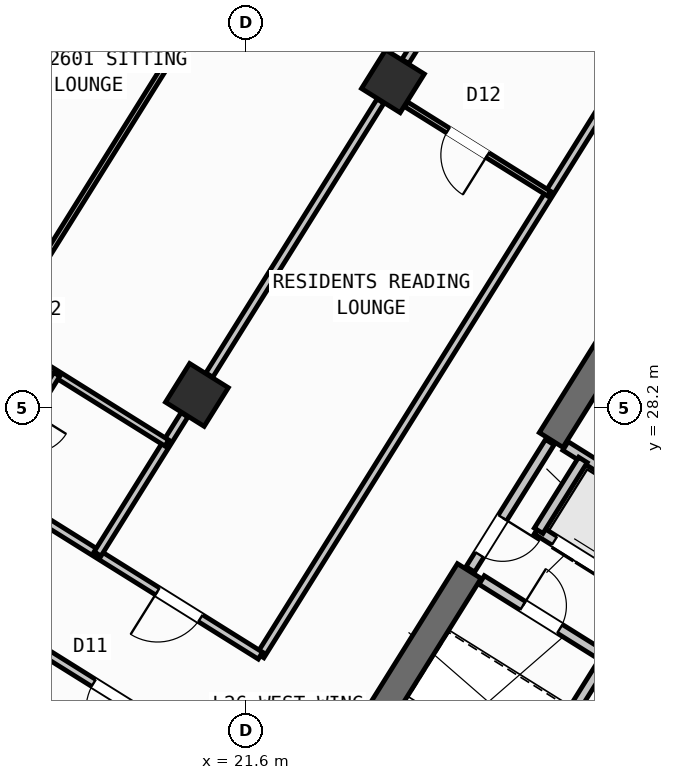
"""IFC4 building model, lengths in metres.
Left out: names, types, materials, properties, quantities, classifications, styles, units other than length and angle.
Written with IfcOpenShell. Run it as: python <this file> out.ifc"""

import sys

from ifc_helpers import new_model, si_unit, direction, frame, frame_2d, origin, origin_2d, place, context, subcontext, project, spatial, rectangle, hollow_rectangle, extrude, source, transform, mapped, element, fill, save


model = new_model("IFC4")
c1 = context("Model", 3, precision=1e-05, world=origin(), true_north=direction((0.0, 1.0)))
c2 = subcontext(c1, "Body", "Model", "MODEL_VIEW")
j1 = project(units=[si_unit("LENGTHUNIT", "METRE"), si_unit("PLANEANGLEUNIT", "RADIAN")], contexts=[c1])
p1 = place(None, origin())
s1 = spatial("IfcSite", under=j1, at=p1, CompositionType="ELEMENT")
p2 = place(p1, origin())
s2 = spatial("IfcBuilding", under=s1, at=p2, CompositionType="ELEMENT")
p3 = place(p2, frame((0.0, 0.0, 105.3)))
s3 = spatial("IfcBuildingStorey", under=s2, at=p3, CompositionType="ELEMENT", Elevation=105.3)
p4 = place(p3, frame((29.517, 30.594, 0.0), z_axis=(0.0, 0.0, 1.0), x_axis=(-0.529906864564, -0.848055844204, 0.0)))
e1 = element("IfcWall", 1, at=p4, inside=s3, PredefinedType="SHEAR", context=c2, shape_type="SweptSolid", body=[
    extrude(rectangle(XDim=3.575, YDim=0.55, at=frame_2d((1.788, 0.0))), origin(), (0.0, 0.0, 1.0), 3.35),
])
p5 = place(p3, frame((26.007, 24.976, 0.0), z_axis=(0.0, 0.0, 1.0), x_axis=(-0.529923795287, -0.848045264823, 0.0)))
e2 = element("IfcWall", 2, at=p5, inside=s3, PredefinedType="SHEAR", context=c2, shape_type="SweptSolid", body=[
    extrude(rectangle(XDim=6.425, YDim=0.55, at=frame_2d((3.212, 0.0))), origin(), (0.0, 0.0, 1.0), 3.35),
])
m1 = source(origin(), c2, "Body", "SweptSolid", [
    extrude(hollow_rectangle(XDim=0.9, YDim=0.9, WallThickness=0.036, at=origin_2d()), origin(), (0.0, 0.0, 1.0), 3.6),
])
for number, where, z_axis, x_axis in (
    (3, (24.5, 34.643, 0.0), (0.0, 0.0, 1.0), (-0.848, 0.53, 0.0)),
    (4, (20.632, 28.452, 0.0), (0.0, 0.0, 1.0), (-0.848, 0.53, 0.0)),
):
    element("IfcColumn", number, at=place(p3, frame(where, z_axis=z_axis, x_axis=x_axis)), inside=s3, PredefinedType="COLUMN", context=c2, shape_type="MappedRepresentation", body=[
        mapped(m1, transform((0.0, 0.0, 0.0), scale=1.0)),
    ])
p6 = place(p3, frame((31.76, 12.183, 0.0), z_axis=(0.0, 0.0, 1.0), x_axis=(-0.848047074256, 0.529920899612, 0.0)))
e5 = element("IfcWall", 5, at=p6, inside=s3, PredefinedType="STANDARD", context=c2, shape_type="SweptSolid", body=[
    extrude(rectangle(XDim=30.652, YDim=0.32, at=frame_2d((15.326, 0.0))), origin(), (0.0, 0.0, 1.0), 3.35),
])
p7 = place(p6, frame((15.153, 0.0, 0.0)))
e6 = element("IfcOpeningElement", 6, at=p7, cuts=e5, PredefinedType="OPENING", context=c2, shape_type="SweptSolid", body=[
    extrude(rectangle(XDim=1.2, YDim=2.15, at=frame_2d((0.6, 1.075))), frame((0.0, 0.17, 0.0), z_axis=(0.0, -1.0, 0.0), x_axis=(1.0, 0.0, 0.0)), (0.0, 0.0, 1.0), 0.34),
])
p8 = place(p6, frame((2.002, 0.0, 0.8)))
e7 = element("IfcOpeningElement", 7, at=p8, cuts=e5, PredefinedType="OPENING", context=c2, shape_type="SweptSolid", body=[
    extrude(rectangle(XDim=2.1, YDim=1.55, at=frame_2d((1.05, 0.775))), frame((0.0, 0.17, 0.0), z_axis=(0.0, -1.0, 0.0), x_axis=(1.0, 0.0, 0.0)), (0.0, 0.0, 1.0), 0.34),
])
p9 = place(p6, frame((7.206, 0.0, 0.8)))
e8 = element("IfcOpeningElement", 8, at=p9, cuts=e5, PredefinedType="OPENING", context=c2, shape_type="SweptSolid", body=[
    extrude(rectangle(XDim=2.1, YDim=1.55, at=frame_2d((1.05, 0.775))), frame((0.0, 0.17, 0.0), z_axis=(0.0, -1.0, 0.0), x_axis=(1.0, 0.0, 0.0)), (0.0, 0.0, 1.0), 0.34),
])
p10 = place(p6, frame((12.648, 0.0, 1.0)))
e9 = element("IfcOpeningElement", 9, at=p10, cuts=e5, PredefinedType="OPENING", context=c2, shape_type="SweptSolid", body=[
    extrude(rectangle(XDim=0.9, YDim=1.25, at=frame_2d((0.45, 0.625))), frame((0.0, 0.17, 0.0), z_axis=(0.0, -1.0, 0.0), x_axis=(1.0, 0.0, 0.0)), (0.0, 0.0, 1.0), 0.34),
])
p11 = place(p6, frame((20.628, 0.0, 0.95)))
e10 = element("IfcOpeningElement", 10, at=p11, cuts=e5, PredefinedType="OPENING", context=c2, shape_type="SweptSolid", body=[
    extrude(rectangle(XDim=1.2, YDim=1.4, at=frame_2d((0.6, 0.7))), frame((0.0, 0.17, 0.0), z_axis=(0.0, -1.0, 0.0), x_axis=(1.0, 0.0, 0.0)), (0.0, 0.0, 1.0), 0.34),
])
p12 = place(p6, frame((26.008, 0.0, 1.0)))
e11 = element("IfcOpeningElement", 11, at=p12, cuts=e5, PredefinedType="OPENING", context=c2, shape_type="SweptSolid", body=[
    extrude(rectangle(XDim=0.9, YDim=1.25, at=frame_2d((0.45, 0.625))), frame((0.0, 0.17, 0.0), z_axis=(0.0, -1.0, 0.0), x_axis=(1.0, 0.0, 0.0)), (0.0, 0.0, 1.0), 0.34),
])
p13 = place(p6, frame((28.408, 0.0, 1.0)))
e12 = element("IfcOpeningElement", 12, at=p13, cuts=e5, PredefinedType="OPENING", context=c2, shape_type="SweptSolid", body=[
    extrude(rectangle(XDim=0.9, YDim=1.25, at=frame_2d((0.45, 0.625))), frame((0.0, 0.17, 0.0), z_axis=(0.0, -1.0, 0.0), x_axis=(1.0, 0.0, 0.0)), (0.0, 0.0, 1.0), 0.34),
])
p14 = place(p3, frame((17.424, 47.083, 0.0), z_axis=(0.0, 0.0, 1.0), x_axis=(0.848049927979, -0.529916332693, 0.0)))
e13 = element("IfcWall", 13, at=p14, inside=s3, PredefinedType="STANDARD", context=c2, shape_type="SweptSolid", body=[
    extrude(rectangle(XDim=29.223, YDim=0.32, at=frame_2d((14.612, 0.0))), origin(), (0.0, 0.0, 1.0), 3.35),
])
p15 = place(p14, frame((3.709, 0.0, 0.0)))
e14 = element("IfcOpeningElement", 14, at=p15, cuts=e13, PredefinedType="OPENING", context=c2, shape_type="SweptSolid", body=[
    extrude(rectangle(XDim=1.05, YDim=2.15, at=frame_2d((0.525, 1.075))), frame((0.0, 0.17, 0.0), z_axis=(0.0, -1.0, 0.0), x_axis=(1.0, 0.0, 0.0)), (0.0, 0.0, 1.0), 0.34),
])
p16 = place(p14, frame((0.659, 0.0, 0.95)))
e15 = element("IfcOpeningElement", 15, at=p16, cuts=e13, PredefinedType="OPENING", context=c2, shape_type="SweptSolid", body=[
    extrude(rectangle(XDim=1.2, YDim=1.4, at=frame_2d((0.6, 0.7))), frame((0.0, 0.17, 0.0), z_axis=(0.0, -1.0, 0.0), x_axis=(1.0, 0.0, 0.0)), (0.0, 0.0, 1.0), 0.34),
])
p17 = place(p14, frame((6.972, 0.0, 1.0)))
e16 = element("IfcOpeningElement", 16, at=p17, cuts=e13, PredefinedType="OPENING", context=c2, shape_type="SweptSolid", body=[
    extrude(rectangle(XDim=0.9, YDim=1.25, at=frame_2d((0.45, 0.625))), frame((0.0, 0.17, 0.0), z_axis=(0.0, -1.0, 0.0), x_axis=(1.0, 0.0, 0.0)), (0.0, 0.0, 1.0), 0.34),
])
p18 = place(p14, frame((9.847, 0.0, 0.85)))
e17 = element("IfcOpeningElement", 17, at=p18, cuts=e13, PredefinedType="OPENING", context=c2, shape_type="SweptSolid", body=[
    extrude(rectangle(XDim=1.5, YDim=1.5, at=frame_2d((0.75, 0.75))), frame((0.0, 0.17, 0.0), z_axis=(0.0, -1.0, 0.0), x_axis=(1.0, 0.0, 0.0)), (0.0, 0.0, 1.0), 0.34),
])
p19 = place(p14, frame((13.889, 0.0, 0.95)))
e18 = element("IfcOpeningElement", 18, at=p19, cuts=e13, PredefinedType="OPENING", context=c2, shape_type="SweptSolid", body=[
    extrude(rectangle(XDim=1.2, YDim=1.4, at=frame_2d((0.6, 0.7))), frame((0.0, 0.17, 0.0), z_axis=(0.0, -1.0, 0.0), x_axis=(1.0, 0.0, 0.0)), (0.0, 0.0, 1.0), 0.34),
])
p20 = place(p14, frame((17.254, 0.0, 1.0)))
e19 = element("IfcOpeningElement", 19, at=p20, cuts=e13, PredefinedType="OPENING", context=c2, shape_type="SweptSolid", body=[
    extrude(rectangle(XDim=0.9, YDim=1.25, at=frame_2d((0.45, 0.625))), frame((0.0, 0.17, 0.0), z_axis=(0.0, -1.0, 0.0), x_axis=(1.0, 0.0, 0.0)), (0.0, 0.0, 1.0), 0.34),
])
p21 = place(p14, frame((20.764, 0.0, 0.8)))
e20 = element("IfcOpeningElement", 20, at=p21, cuts=e13, PredefinedType="OPENING", context=c2, shape_type="SweptSolid", body=[
    extrude(rectangle(XDim=2.1, YDim=1.55, at=frame_2d((1.05, 0.775))), frame((0.0, 0.17, 0.0), z_axis=(0.0, -1.0, 0.0), x_axis=(1.0, 0.0, 0.0)), (0.0, 0.0, 1.0), 0.34),
])
p22 = place(p14, frame((25.403, 0.0, 0.8)))
e21 = element("IfcOpeningElement", 21, at=p22, cuts=e13, PredefinedType="OPENING", context=c2, shape_type="SweptSolid", body=[
    extrude(rectangle(XDim=2.1, YDim=1.55, at=frame_2d((1.05, 0.775))), frame((0.0, 0.17, 0.0), z_axis=(0.0, -1.0, 0.0), x_axis=(1.0, 0.0, 0.0)), (0.0, 0.0, 1.0), 0.34),
])
p23 = place(p3, frame((31.822, 24.998, 0.0), z_axis=(0.0, 0.0, 1.0), x_axis=(-0.848036912365, 0.52993716162, 0.0)))
e22 = element("IfcWall", 22, at=p23, inside=s3, PredefinedType="STANDARD", context=c2, shape_type="SweptSolid", body=[
    extrude(rectangle(XDim=4.618, YDim=0.2, at=frame_2d((2.309, 0.0))), origin(), (0.0, 0.0, 1.0), 3.34),
])
p24 = place(p3, frame((32.108, 22.814, 0.0), z_axis=(0.0, 0.0, 1.0), x_axis=(-0.848042229521, 0.529928652696, 0.0)))
e23 = element("IfcWall", 23, at=p24, inside=s3, PredefinedType="STANDARD", context=c2, shape_type="SweptSolid", body=[
    extrude(rectangle(XDim=5.62, YDim=0.2, at=frame_2d((2.81, 0.0))), origin(), (0.0, 0.0, 1.0), 3.34),
])
p25 = place(p24, frame((0.39, 0.0, 0.0)))
e24 = element("IfcOpeningElement", 24, at=p25, cuts=e23, PredefinedType="OPENING", context=c2, shape_type="SweptSolid", body=[
    extrude(rectangle(XDim=1.1, YDim=2.15, at=frame_2d((0.55, 1.075))), frame((0.0, 0.11, 0.0), z_axis=(0.0, -1.0, 0.0), x_axis=(1.0, 0.0, 0.0)), (0.0, 0.0, 1.0), 0.22),
])
p26 = place(p24, frame((2.25, 0.0, 0.0)))
e25 = element("IfcOpeningElement", 25, at=p26, cuts=e23, PredefinedType="OPENING", context=c2, shape_type="SweptSolid", body=[
    extrude(rectangle(XDim=1.1, YDim=2.15, at=frame_2d((0.55, 1.075))), frame((0.0, 0.11, 0.0), z_axis=(0.0, -1.0, 0.0), x_axis=(1.0, 0.0, 0.0)), (0.0, 0.0, 1.0), 0.22),
])
p27 = place(p24, frame((4.11, 0.0, 0.0)))
e26 = element("IfcOpeningElement", 26, at=p27, cuts=e23, PredefinedType="OPENING", context=c2, shape_type="SweptSolid", body=[
    extrude(rectangle(XDim=1.1, YDim=2.15, at=frame_2d((0.55, 1.075))), frame((0.0, 0.11, 0.0), z_axis=(0.0, -1.0, 0.0), x_axis=(1.0, 0.0, 0.0)), (0.0, 0.0, 1.0), 0.22),
])
p28 = place(p3, frame((28.25, 27.17, 0.0), z_axis=(0.0, 0.0, 1.0), x_axis=(-0.529905827651, -0.848056492117, 0.0)))
e27 = element("IfcWall", 27, at=p28, inside=s3, PredefinedType="STANDARD", context=c2, shape_type="SweptSolid", body=[
    extrude(rectangle(XDim=1.65, YDim=0.2, at=frame_2d((0.825, 0.0))), origin(), (0.0, 0.0, 1.0), 3.34),
])
p29 = place(p3, frame((28.71, 23.263, 0.0), z_axis=(0.0, 0.0, 1.0), x_axis=(-0.529907497854, -0.848055448493, 0.0)))
e28 = element("IfcWall", 28, at=p29, inside=s3, PredefinedType="STANDARD", context=c2, shape_type="SweptSolid", body=[
    extrude(rectangle(XDim=2.88, YDim=0.2, at=frame_2d((1.44, 0.0))), origin(), (0.0, 0.0, 1.0), 3.34),
])
p30 = place(p3, frame((31.525, 21.504, 0.0), z_axis=(0.0, 0.0, 1.0), x_axis=(-0.848040211232, 0.529931882541, 0.0)))
e29 = element("IfcWall", 29, at=p30, inside=s3, PredefinedType="STANDARD", context=c2, shape_type="SweptSolid", body=[
    extrude(rectangle(XDim=6.218, YDim=0.2, at=frame_2d((3.109, 0.0))), origin(), (0.0, 0.0, 1.0), 3.34),
])
p31 = place(p30, frame((4.4, 0.0, 0.0)))
e30 = element("IfcOpeningElement", 30, at=p31, cuts=e29, PredefinedType="OPENING", context=c2, shape_type="SweptSolid", body=[
    extrude(rectangle(XDim=0.86, YDim=2.05, at=frame_2d((0.43, 1.025))), frame((0.0, 0.11, 0.0), z_axis=(0.0, -1.0, 0.0), x_axis=(1.0, 0.0, 0.0)), (0.0, 0.0, 1.0), 0.22),
])
p32 = place(p30, frame((1.45, 0.0, 0.0)))
e31 = element("IfcOpeningElement", 31, at=p32, cuts=e29, PredefinedType="OPENING", context=c2, shape_type="SweptSolid", body=[
    extrude(rectangle(XDim=0.86, YDim=2.05, at=frame_2d((0.43, 1.025))), frame((0.0, 0.11, 0.0), z_axis=(0.0, -1.0, 0.0), x_axis=(1.0, 0.0, 0.0)), (0.0, 0.0, 1.0), 0.22),
])
p33 = place(p3, frame((27.596, 27.52, 0.0), z_axis=(0.0, 0.0, 1.0), x_axis=(-0.529865479138, -0.848081702443, 0.0)))
e32 = element("IfcWall", 32, at=p33, inside=s3, PredefinedType="STANDARD", context=c2, shape_type="SweptSolid", body=[
    extrude(rectangle(XDim=2.96, YDim=0.2, at=frame_2d((1.48, 0.0))), origin(), (0.0, 0.0, 1.0), 3.34),
])
p34 = place(p33, frame((1.76, 0.0, 0.0)))
e33 = element("IfcOpeningElement", 33, at=p34, cuts=e32, PredefinedType="OPENING", context=c2, shape_type="SweptSolid", body=[
    extrude(rectangle(XDim=0.86, YDim=2.05, at=frame_2d((0.43, 1.025))), frame((0.0, 0.11, 0.0), z_axis=(0.0, -1.0, 0.0), x_axis=(1.0, 0.0, 0.0)), (0.0, 0.0, 1.0), 0.22),
])
p35 = place(p3, frame((31.239, 38.274, 0.0), z_axis=(0.0, 0.0, 1.0), x_axis=(-0.529918119251, -0.84804881162, 0.0)))
e34 = element("IfcWall", 34, at=p35, inside=s3, PredefinedType="PARTITIONING", context=c2, shape_type="SweptSolid", body=[
    extrude(rectangle(XDim=17.65, YDim=0.16, at=frame_2d((8.825, 0.0))), origin(), (0.0, 0.0, 1.0), 3.34),
])
p36 = place(p3, frame((21.885, 23.306, 0.0), z_axis=(0.0, 0.0, 1.0), x_axis=(-0.848052408131, 0.529912363569, 0.0)))
e35 = element("IfcWall", 35, at=p36, inside=s3, PredefinedType="PARTITIONING", context=c2, shape_type="SweptSolid", body=[
    extrude(rectangle(XDim=16.73, YDim=0.16, at=frame_2d((8.365, 0.0))), origin(), (0.0, 0.0, 1.0), 3.34),
])
p37 = place(p36, frame((1.395, 0.0, 0.0)))
e36 = element("IfcOpeningElement", 36, at=p37, cuts=e35, PredefinedType="OPENING", context=c2, shape_type="SweptSolid", body=[
    extrude(rectangle(XDim=1.0, YDim=2.1, at=frame_2d((0.5, 1.05))), frame((0.0, 0.09, 0.0), z_axis=(0.0, -1.0, 0.0), x_axis=(1.0, 0.0, 0.0)), (0.0, 0.0, 1.0), 0.18),
])
p38 = place(p36, frame((7.82, 0.0, 0.0)))
e37 = element("IfcOpeningElement", 37, at=p38, cuts=e35, PredefinedType="OPENING", context=c2, shape_type="SweptSolid", body=[
    extrude(rectangle(XDim=1.0, YDim=2.1, at=frame_2d((0.5, 1.05))), frame((0.0, 0.09, 0.0), z_axis=(0.0, -1.0, 0.0), x_axis=(1.0, 0.0, 0.0)), (0.0, 0.0, 1.0), 0.18),
])
p39 = place(p36, frame((14.76, 0.0, 0.0)))
e38 = element("IfcOpeningElement", 38, at=p39, cuts=e35, PredefinedType="OPENING", context=c2, shape_type="SweptSolid", body=[
    extrude(rectangle(XDim=1.0, YDim=2.1, at=frame_2d((0.5, 1.05))), frame((0.0, 0.09, 0.0), z_axis=(0.0, -1.0, 0.0), x_axis=(1.0, 0.0, 0.0)), (0.0, 0.0, 1.0), 0.18),
])
p40 = place(p3, frame((20.719, 21.44, 0.0), z_axis=(0.0, 0.0, 1.0), x_axis=(-0.848048310262, 0.529918921593, 0.0)))
e39 = element("IfcWall", 39, at=p40, inside=s3, PredefinedType="PARTITIONING", context=c2, shape_type="SweptSolid", body=[
    extrude(rectangle(XDim=16.73, YDim=0.16, at=frame_2d((8.365, 0.0))), origin(), (0.0, 0.0, 1.0), 3.34),
])
p41 = place(p40, frame((1.505, 0.0, 0.0)))
e40 = element("IfcOpeningElement", 40, at=p41, cuts=e39, PredefinedType="OPENING", context=c2, shape_type="SweptSolid", body=[
    extrude(rectangle(XDim=1.0, YDim=2.1, at=frame_2d((0.5, 1.05))), frame((0.0, 0.09, 0.0), z_axis=(0.0, -1.0, 0.0), x_axis=(1.0, 0.0, 0.0)), (0.0, 0.0, 1.0), 0.18),
])
p42 = place(p40, frame((6.435, 0.0, 0.0)))
e41 = element("IfcOpeningElement", 41, at=p42, cuts=e39, PredefinedType="OPENING", context=c2, shape_type="SweptSolid", body=[
    extrude(rectangle(XDim=1.0, YDim=2.1, at=frame_2d((0.5, 1.05))), frame((0.0, 0.09, 0.0), z_axis=(0.0, -1.0, 0.0), x_axis=(1.0, 0.0, 0.0)), (0.0, 0.0, 1.0), 0.18),
])
p43 = place(p40, frame((12.784, 0.0, 0.0)))
e42 = element("IfcOpeningElement", 42, at=p43, cuts=e39, PredefinedType="OPENING", context=c2, shape_type="SweptSolid", body=[
    extrude(rectangle(XDim=1.0, YDim=2.1, at=frame_2d((0.5, 1.05))), frame((0.0, 0.09, 0.0), z_axis=(0.0, -1.0, 0.0), x_axis=(1.0, 0.0, 0.0)), (0.0, 0.0, 1.0), 0.18),
])
p44 = place(p3, frame((27.607, 39.615, 0.0), z_axis=(0.0, 0.0, 1.0), x_axis=(-0.529913610495, -0.848051628978, 0.0)))
e43 = element("IfcWall", 43, at=p44, inside=s3, PredefinedType="PARTITIONING", context=c2, shape_type="SweptSolid", body=[
    extrude(rectangle(XDim=5.401, YDim=0.16, at=frame_2d((2.7, 0.0))), origin(), (0.0, 0.0, 1.0), 2.775),
])
p45 = place(p3, frame((24.256, 34.251, 0.0), z_axis=(0.0, 0.0, 1.0), x_axis=(-0.529919772691, -0.848047778437, 0.0)))
e44 = element("IfcWall", 44, at=p45, inside=s3, PredefinedType="PARTITIONING", context=c2, shape_type="SweptSolid", body=[
    extrude(rectangle(XDim=6.376, YDim=0.16, at=frame_2d((3.188, 0.0))), origin(), (0.0, 0.0, 1.0), 2.775),
])
p46 = place(p3, frame((20.387, 28.06, 0.0), z_axis=(0.0, 0.0, 1.0), x_axis=(-0.529890499457, -0.848066069705, 0.0)))
e45 = element("IfcWall", 45, at=p46, inside=s3, PredefinedType="PARTITIONING", context=c2, shape_type="SweptSolid", body=[
    extrude(rectangle(XDim=3.238, YDim=0.16, at=frame_2d((1.619, 0.0))), origin(), (0.0, 0.0, 1.0), 2.775),
])
p47 = place(p3, frame((27.583, 32.424, 0.0), z_axis=(0.0, 0.0, 1.0), x_axis=(-0.848031272749, 0.529946186362, 0.0)))
e46 = element("IfcWall", 46, at=p47, inside=s3, PredefinedType="PARTITIONING", context=c2, shape_type="SweptSolid", body=[
    extrude(rectangle(XDim=3.328, YDim=0.11, at=frame_2d((1.664, 0.0))), origin(), (0.0, 0.0, 1.0), 2.775),
])
p48 = place(p47, frame((1.435, 0.0, 0.0)))
e47 = element("IfcOpeningElement", 47, at=p48, cuts=e46, PredefinedType="OPENING", context=c2, shape_type="SweptSolid", body=[
    extrude(rectangle(XDim=0.92, YDim=2.08, at=frame_2d((0.46, 1.04))), frame((0.0, 0.065, 0.0), z_axis=(0.0, -1.0, 0.0), x_axis=(1.0, 0.0, 0.0)), (0.0, 0.0, 1.0), 0.13),
])
p49 = place(p3, frame((18.828, 37.643, 0.0), z_axis=(0.0, 0.0, 1.0), x_axis=(-0.529930102756, -0.848041323399, 0.0)))
e48 = element("IfcWall", 48, at=p49, inside=s3, PredefinedType="PARTITIONING", context=c2, shape_type="SweptSolid", body=[
    extrude(rectangle(XDim=6.376, YDim=0.16, at=frame_2d((3.188, 0.0))), origin(), (0.0, 0.0, 1.0), 2.775),
])
p50 = place(p3, frame((20.039, 27.502, 0.0), z_axis=(0.0, 0.0, 1.0), x_axis=(-0.848039019877, 0.529933789039, 0.0)))
e49 = element("IfcWall", 49, at=p50, inside=s3, PredefinedType="PLUMBINGWALL", context=c2, shape_type="SweptSolid", body=[
    extrude(rectangle(XDim=6.4, YDim=0.14, at=frame_2d((3.2, 0.0))), origin(), (0.0, 0.0, 1.0), 3.34),
])
p51 = place(p50, frame((2.824, 0.0, 0.0)))
e50 = element("IfcOpeningElement", 50, at=p51, cuts=e49, PredefinedType="OPENING", context=c2, shape_type="SweptSolid", body=[
    extrude(rectangle(XDim=0.78, YDim=2.05, at=frame_2d((0.39, 1.025))), frame((0.0, 0.08, 0.0), z_axis=(0.0, -1.0, 0.0), x_axis=(1.0, 0.0, 0.0)), (0.0, 0.0, 1.0), 0.16),
])
p52 = place(p3, frame((17.867, 28.859, 0.0), z_axis=(0.0, 0.0, 1.0), x_axis=(-0.529913878929, -0.848051461244, 0.0)))
e51 = element("IfcWall", 51, at=p52, inside=s3, PredefinedType="PLUMBINGWALL", context=c2, shape_type="SweptSolid", body=[
    extrude(rectangle(XDim=2.58, YDim=0.14, at=frame_2d((1.29, 0.0))), origin(), (0.0, 0.0, 1.0), 3.34),
])
p53 = place(p52, frame((0.9, 0.0, 0.0)))
e52 = element("IfcOpeningElement", 52, at=p53, cuts=e51, PredefinedType="OPENING", context=c2, shape_type="SweptSolid", body=[
    extrude(rectangle(XDim=0.78, YDim=2.05, at=frame_2d((0.39, 1.025))), frame((0.0, 0.08, 0.0), z_axis=(0.0, -1.0, 0.0), x_axis=(1.0, 0.0, 0.0)), (0.0, 0.0, 1.0), 0.16),
])
p54 = place(p3, frame((24.802, 42.614, 0.0), z_axis=(0.0, 0.0, 1.0), x_axis=(-0.529928839727, -0.848042112649, 0.0)))
e53 = element("IfcWall", 53, at=p54, inside=s3, PredefinedType="PARTITIONING", context=c2, shape_type="SweptSolid", body=[
    extrude(rectangle(XDim=15.34, YDim=0.11, at=frame_2d((7.67, 0.0))), origin(), (0.0, 0.0, 1.0), 3.34),
])
p55 = place(p54, frame((0.47, 0.0, 0.0)))
e54 = element("IfcOpeningElement", 54, at=p55, cuts=e53, PredefinedType="OPENING", context=c2, shape_type="SweptSolid", body=[
    extrude(rectangle(XDim=0.92, YDim=2.08, at=frame_2d((0.46, 1.04))), frame((0.0, 0.065, 0.0), z_axis=(0.0, -1.0, 0.0), x_axis=(1.0, 0.0, 0.0)), (0.0, 0.0, 1.0), 0.13),
])
p56 = place(p3, frame((19.67, 45.821, 0.0), z_axis=(0.0, 0.0, 1.0), x_axis=(-0.529916887708, -0.848049581169, 0.0)))
e55 = element("IfcWall", 55, at=p56, inside=s3, PredefinedType="PARTITIONING", context=c2, shape_type="SweptSolid", body=[
    extrude(rectangle(XDim=17.92, YDim=0.11, at=frame_2d((8.96, 0.0))), origin(), (0.0, 0.0, 1.0), 3.34),
])
p57 = place(p56, frame((16.28, 0.0, 0.0)))
e56 = element("IfcOpeningElement", 56, at=p57, cuts=e55, PredefinedType="OPENING", context=c2, shape_type="SweptSolid", body=[
    extrude(rectangle(XDim=0.78, YDim=2.05, at=frame_2d((0.39, 1.025))), frame((0.0, 0.065, 0.0), z_axis=(0.0, -1.0, 0.0), x_axis=(1.0, 0.0, 0.0)), (0.0, 0.0, 1.0), 0.13),
])
p58 = place(p56, frame((10.711, 0.0, 0.0)))
e57 = element("IfcOpeningElement", 57, at=p58, cuts=e55, PredefinedType="OPENING", context=c2, shape_type="SweptSolid", body=[
    extrude(rectangle(XDim=0.92, YDim=2.08, at=frame_2d((0.46, 1.04))), frame((0.0, 0.065, 0.0), z_axis=(0.0, -1.0, 0.0), x_axis=(1.0, 0.0, 0.0)), (0.0, 0.0, 1.0), 0.13),
])
m2 = source(origin(), c2, "Body", "SweptSolid", [
    extrude(rectangle(XDim=1.1, YDim=2.15, at=frame_2d((0.55, 1.075))), frame((0.0, 0.025, 0.0), z_axis=(0.0, -1.0, 0.0), x_axis=(1.0, 0.0, 0.0)), (0.0, 0.0, 1.0), 0.05),
])
p59 = place(p27, origin())
e58 = element("IfcDoor", 58, at=p59, inside=s3, OperationType="DOUBLE_DOOR_SLIDING", PredefinedType="DOOR", context=c2, shape_type="MappedRepresentation", body=[
    mapped(m2, transform((0.0, 0.0, 0.0), scale=1.0)),
])
fill(e26, e58)
m3 = source(origin(), c2, "Body", "SweptSolid", [
    extrude(rectangle(XDim=0.86, YDim=2.05, at=frame_2d((0.43, 1.025))), frame((0.0, 0.025, 0.0), z_axis=(0.0, -1.0, 0.0), x_axis=(1.0, 0.0, 0.0)), (0.0, 0.0, 1.0), 0.05),
])
p60 = place(p31, frame((0.86, 0.0, 0.0), z_axis=(0.0, 0.0, 1.0), x_axis=(-1.0, 0.0, 0.0)))
e59 = element("IfcDoor", 59, at=p60, inside=s3, OperationType="SINGLE_SWING_LEFT", PredefinedType="DOOR", context=c2, shape_type="MappedRepresentation", body=[
    mapped(m3, transform((0.0, 0.0, 0.0), scale=1.0)),
])
fill(e30, e59)
p61 = place(p34, origin())
e60 = element("IfcDoor", 60, at=p61, inside=s3, OperationType="SINGLE_SWING_LEFT", PredefinedType="DOOR", context=c2, shape_type="MappedRepresentation", body=[
    mapped(m3, transform((0.0, 0.0, 0.0), scale=1.0)),
])
fill(e33, e60)
m4 = source(origin(), c2, "Body", "SweptSolid", [
    extrude(rectangle(XDim=1.0, YDim=2.1, at=frame_2d((0.5, 1.05))), frame((0.0, 0.025, 0.0), z_axis=(0.0, -1.0, 0.0), x_axis=(1.0, 0.0, 0.0)), (0.0, 0.0, 1.0), 0.05),
])
p62 = place(p41, origin())
e61 = element("IfcDoor", 61, at=p62, inside=s3, OperationType="SINGLE_SWING_LEFT", PredefinedType="DOOR", context=c2, shape_type="MappedRepresentation", body=[
    mapped(m4, transform((0.0, 0.0, 0.0), scale=1.0)),
])
fill(e40, e61)
p63 = place(p37, origin())
e62 = element("IfcDoor", 62, at=p63, inside=s3, OperationType="SINGLE_SWING_RIGHT", PredefinedType="DOOR", context=c2, shape_type="MappedRepresentation", body=[
    mapped(m4, transform((0.0, 0.0, 0.0), scale=1.0)),
])
fill(e36, e62)
m5 = source(origin(), c2, "Body", "SweptSolid", [
    extrude(rectangle(XDim=0.92, YDim=2.08, at=frame_2d((0.46, 1.04))), frame((0.0, 0.025, 0.0), z_axis=(0.0, -1.0, 0.0), x_axis=(1.0, 0.0, 0.0)), (0.0, 0.0, 1.0), 0.05),
])
p64 = place(p48, origin())
e63 = element("IfcDoor", 63, at=p64, inside=s3, OperationType="SINGLE_SWING_LEFT", PredefinedType="DOOR", context=c2, shape_type="MappedRepresentation", body=[
    mapped(m5, transform((0.0, 0.0, 0.0), scale=1.0)),
])
fill(e47, e63)
save(model, sys.argv[1])
